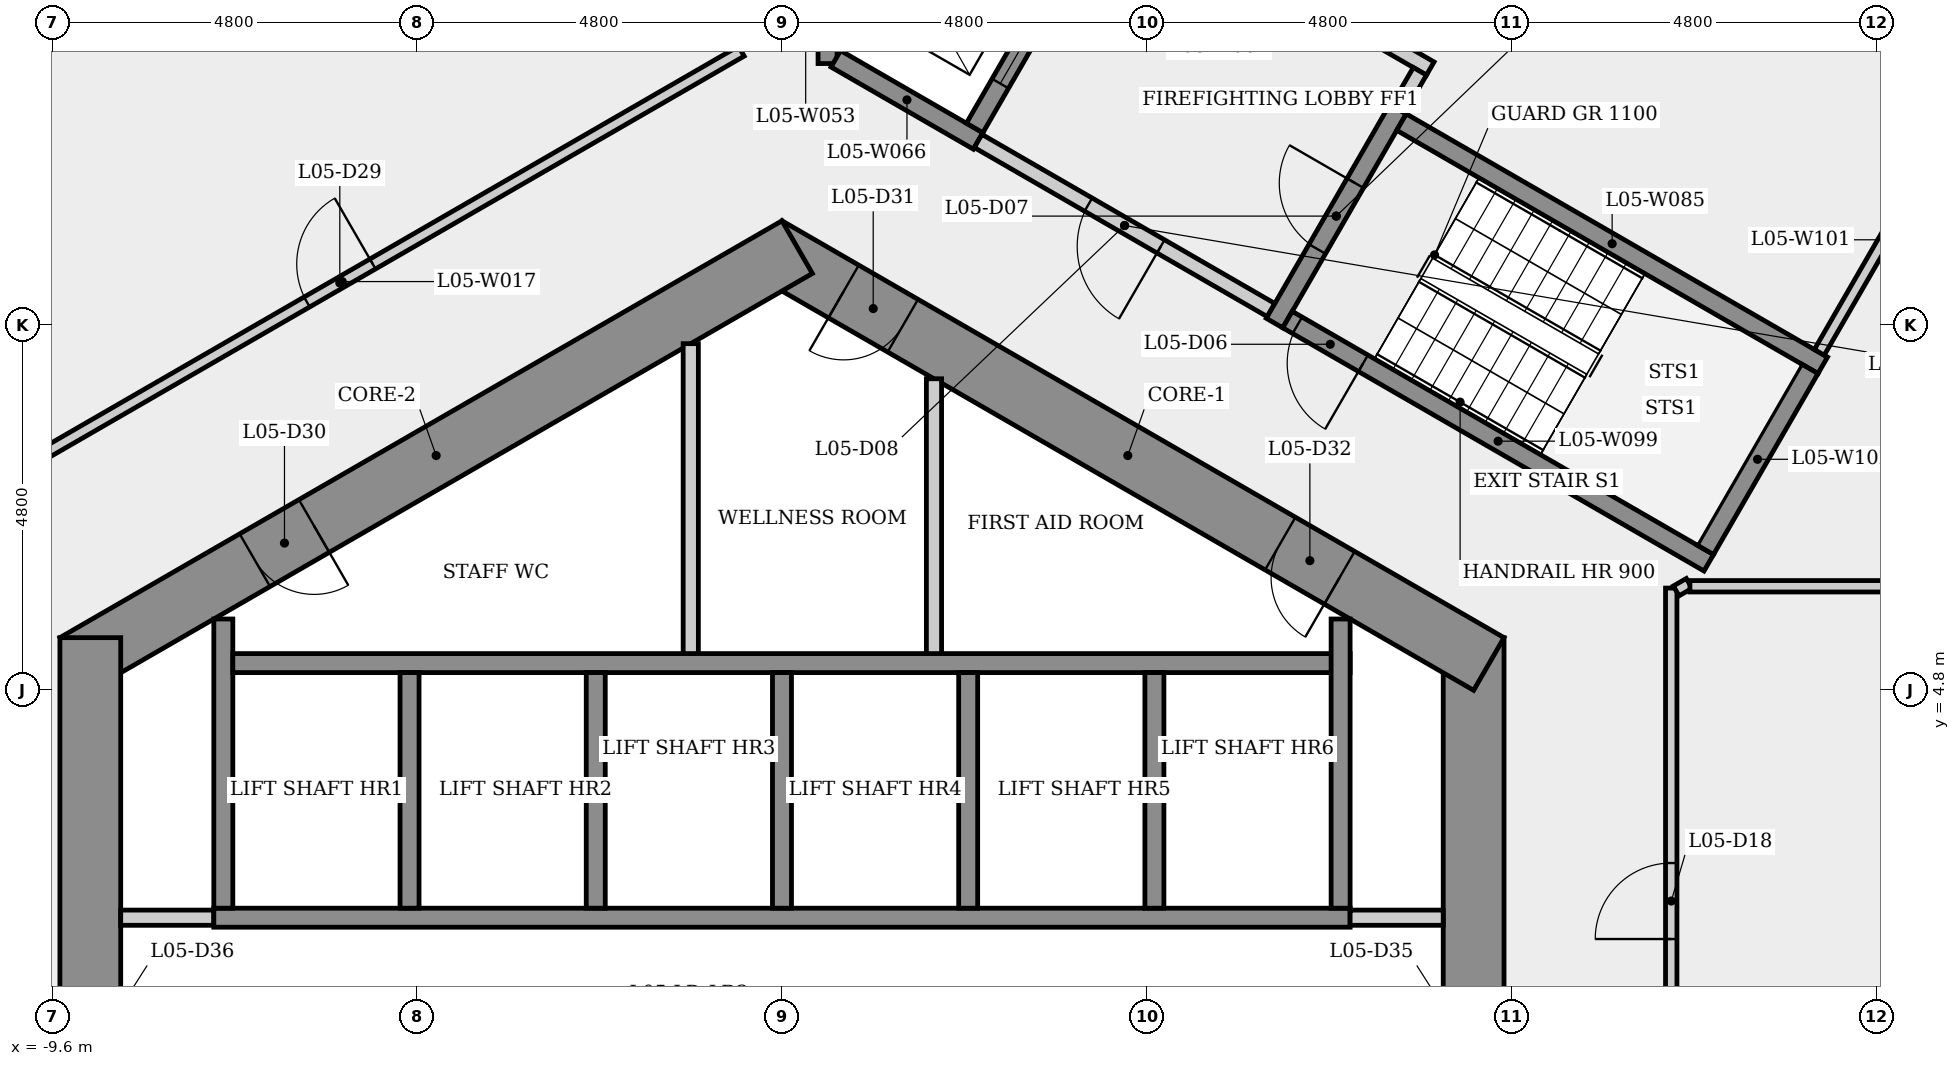
"""IFC4 building model, lengths in metres.
Left out: names, types, materials, properties, quantities, classifications, styles, units other than length and angle.
Written with IfcOpenShell. Run it as: python <this file> out.ifc"""

import sys

from ifc_helpers import new_model, si_unit, direction, frame, frame_2d, origin, place, context, subcontext, project, spatial, rectangle, extrude, element, fill, save


model = new_model("IFC4")
c1 = context("Model", 3, precision=1e-05, world=origin(), true_north=direction((0.0, 1.0)))
c2 = subcontext(c1, "Body", "Model", "MODEL_VIEW")
j1 = project(units=[si_unit("LENGTHUNIT", "METRE"), si_unit("PLANEANGLEUNIT", "RADIAN")], contexts=[c1])
p1 = place(None, origin())
s1 = spatial("IfcSite", under=j1, at=p1, CompositionType="ELEMENT")
p2 = place(p1, origin())
s2 = spatial("IfcBuilding", under=s1, at=p2, CompositionType="ELEMENT")
p3 = place(p2, frame((0.0, 0.0, 25.5)))
s3 = spatial("IfcBuildingStorey", under=s2, at=p3, CompositionType="ELEMENT", Elevation=25.5)
p4 = place(p3, frame((9.1, -5.485, 0.0), z_axis=(0.0, 0.0, 1.0), x_axis=(0.0, 1.0, 0.0)))
e1 = element("IfcWall", 1, at=p4, inside=s3, PredefinedType="SHEAR", context=c2, shape_type="SweptSolid", body=[
    extrude(rectangle(XDim=10.97, YDim=0.8, at=frame_2d((5.485, 0.0))), origin(), (0.0, 0.0, 1.0), 3.4),
])
p5 = place(p4, frame((4.685, 0.0, 0.0)))
e2 = element("IfcOpeningElement", 2, at=p5, cuts=e1, PredefinedType="OPENING", context=c2, shape_type="SweptSolid", body=[
    extrude(rectangle(XDim=1.6, YDim=2.1, at=frame_2d((0.8, 1.05))), frame((0.0, 0.41, 0.0), z_axis=(0.0, -1.0, 0.0), x_axis=(1.0, 0.0, 0.0)), (0.0, 0.0, 1.0), 0.82),
])
p6 = place(p3, frame((9.3, 5.138, 0.0), z_axis=(0.0, 0.0, 1.0), x_axis=(-0.866023993627, 0.500002442456, 0.0)))
e3 = element("IfcWall", 3, at=p6, inside=s3, PredefinedType="SHEAR", context=c2, shape_type="SweptSolid", body=[
    extrude(rectangle(XDim=10.97, YDim=0.8, at=frame_2d((5.485, 0.0))), origin(), (0.0, 0.0, 1.0), 3.4),
])
p7 = place(p6, frame((8.903, 0.0, 0.0)))
e4 = element("IfcOpeningElement", 4, at=p7, cuts=e3, PredefinedType="OPENING", context=c2, shape_type="SweptSolid", body=[
    extrude(rectangle(XDim=0.9, YDim=2.1, at=frame_2d((0.45, 1.05))), frame((0.0, 0.41, 0.0), z_axis=(0.0, -1.0, 0.0), x_axis=(1.0, 0.0, 0.0)), (0.0, 0.0, 1.0), 0.82),
])
p8 = place(p6, frame((2.269, 0.0, 0.0)))
e5 = element("IfcOpeningElement", 5, at=p8, cuts=e3, PredefinedType="OPENING", context=c2, shape_type="SweptSolid", body=[
    extrude(rectangle(XDim=0.9, YDim=2.1, at=frame_2d((0.45, 1.05))), frame((0.0, 0.41, 0.0), z_axis=(0.0, -1.0, 0.0), x_axis=(1.0, 0.0, 0.0)), (0.0, 0.0, 1.0), 0.82),
])
p9 = place(p3, frame((0.2, 10.623, 0.0), z_axis=(0.0, 0.0, 1.0), x_axis=(-0.866023993627, -0.500002442456, 0.0)))
e6 = element("IfcWall", 6, at=p9, inside=s3, PredefinedType="SHEAR", context=c2, shape_type="SweptSolid", body=[
    extrude(rectangle(XDim=10.97, YDim=0.8, at=frame_2d((5.485, 0.0))), origin(), (0.0, 0.0, 1.0), 3.4),
])
p10 = place(p9, frame((7.339, 0.0, 0.0)))
e7 = element("IfcOpeningElement", 7, at=p10, cuts=e6, PredefinedType="OPENING", context=c2, shape_type="SweptSolid", body=[
    extrude(rectangle(XDim=0.9, YDim=2.1, at=frame_2d((0.45, 1.05))), frame((0.0, 0.41, 0.0), z_axis=(0.0, -1.0, 0.0), x_axis=(1.0, 0.0, 0.0)), (0.0, 0.0, 1.0), 0.82),
])
p11 = place(p3, frame((-9.1, 5.485, 0.0), z_axis=(0.0, 0.0, 1.0), x_axis=(0.0, -1.0, 0.0)))
e8 = element("IfcWall", 8, at=p11, inside=s3, PredefinedType="SHEAR", context=c2, shape_type="SweptSolid", body=[
    extrude(rectangle(XDim=10.97, YDim=0.8, at=frame_2d((5.485, 0.0))), origin(), (0.0, 0.0, 1.0), 3.4),
])
p12 = place(p11, frame((4.685, 0.0, 0.0)))
e9 = element("IfcOpeningElement", 9, at=p12, cuts=e8, PredefinedType="OPENING", context=c2, shape_type="SweptSolid", body=[
    extrude(rectangle(XDim=1.6, YDim=2.1, at=frame_2d((0.8, 1.05))), frame((0.0, 0.41, 0.0), z_axis=(0.0, -1.0, 0.0), x_axis=(1.0, 0.0, 0.0)), (0.0, 0.0, 1.0), 0.82),
])
p13 = place(p3, frame((-11.035, 7.139, 0.0), z_axis=(0.0, 0.0, 1.0), x_axis=(0.866022616891, 0.50000482701, 0.0)))
e10 = element("IfcWall", 10, at=p13, inside=s3, PredefinedType="PARTITIONING", context=c2, shape_type="SweptSolid", body=[
    extrude(rectangle(XDim=12.125, YDim=0.15, at=frame_2d((6.062, 0.0))), origin(), (0.0, 0.0, 1.0), 3.05),
])
p14 = place(p13, frame((5.525, 0.0, 0.0)))
e11 = element("IfcOpeningElement", 11, at=p14, cuts=e10, PredefinedType="OPENING", context=c2, shape_type="SweptSolid", body=[
    extrude(rectangle(XDim=1.0, YDim=2.1, at=frame_2d((0.5, 1.05))), frame((0.0, 0.085, 0.0), z_axis=(0.0, -1.0, 0.0), x_axis=(1.0, 0.0, 0.0)), (0.0, 0.0, 1.0), 0.17),
])
p15 = place(p3, frame((-8.7, 1.8, 0.0), z_axis=(0.0, 0.0, 1.0), x_axis=(1.0, 0.0, 0.0)))
e12 = element("IfcWall", 12, at=p15, inside=s3, PredefinedType="PARTITIONING", context=c2, shape_type="SweptSolid", body=[
    extrude(rectangle(XDim=1.225, YDim=0.2, at=frame_2d((0.613, 0.0))), origin(), (0.0, 0.0, 1.0), 3.05),
])
p16 = place(p3, frame((-7.475, 1.8, 0.0), z_axis=(0.0, 0.0, 1.0), x_axis=(1.0, 0.0, 0.0)))
e13 = element("IfcWall", 13, at=p16, inside=s3, PredefinedType="SHEAR", context=c2, shape_type="SweptSolid", body=[
    extrude(rectangle(XDim=14.95, YDim=0.25, at=frame_2d((7.475, 0.0))), origin(), (0.0, 0.0, 1.0), 3.05),
])
p17 = place(p3, frame((-7.35, 1.925, 0.0), z_axis=(0.0, 0.0, 1.0), x_axis=(0.0, 1.0, 0.0)))
e14 = element("IfcWall", 14, at=p17, inside=s3, PredefinedType="SHEAR", context=c2, shape_type="SweptSolid", body=[
    extrude(rectangle(XDim=3.805, YDim=0.25, at=frame_2d((1.903, 0.0))), origin(), (0.0, 0.0, 1.0), 3.05),
])
p18 = place(p3, frame((-7.225, 5.15, 0.0), z_axis=(0.0, 0.0, 1.0), x_axis=(1.0, 0.0, 0.0)))
e15 = element("IfcWall", 15, at=p18, inside=s3, PredefinedType="SHEAR", context=c2, shape_type="SweptSolid", body=[
    extrude(rectangle(XDim=14.7, YDim=0.25, at=frame_2d((7.35, 0.0))), origin(), (0.0, 0.0, 1.0), 3.05),
])
for number, where, z_axis, x_axis in (
    (16, (-4.9, 5.025, 0.0), (0.0, 0.0, 1.0), (0.0, -1.0, 0.0)),
    (17, (-2.45, 5.025, 0.0), (0.0, 0.0, 1.0), (0.0, -1.0, 0.0)),
):
    element("IfcWall", number, at=place(p3, frame(where, z_axis=z_axis, x_axis=x_axis)), inside=s3, PredefinedType="SHEAR", context=c2, shape_type="SweptSolid", body=[
        extrude(rectangle(XDim=3.1, YDim=0.25, at=frame_2d((1.55, 0.0))), origin(), (0.0, 0.0, 1.0), 3.4),
    ])
p19 = place(p3, frame((-1.2, 9.353, 0.0), z_axis=(0.0, 0.0, 1.0), x_axis=(0.0, -1.0, 0.0)))
e18 = element("IfcWall", 18, at=p19, inside=s3, PredefinedType="PARTITIONING", context=c2, shape_type="SweptSolid", body=[
    extrude(rectangle(XDim=4.078, YDim=0.2, at=frame_2d((2.039, 0.0))), origin(), (0.0, 0.0, 1.0), 3.05),
])
p20 = place(p3, frame((0.0, 5.025, 0.0), z_axis=(0.0, 0.0, 1.0), x_axis=(0.0, -1.0, 0.0)))
e19 = element("IfcWall", 19, at=p20, inside=s3, PredefinedType="SHEAR", context=c2, shape_type="SweptSolid", body=[
    extrude(rectangle(XDim=3.1, YDim=0.25, at=frame_2d((1.55, 0.0))), origin(), (0.0, 0.0, 1.0), 3.4),
])
p21 = place(p3, frame((0.6, 13.039, 0.0), z_axis=(0.0, 0.0, 1.0), x_axis=(0.0, 1.0, 0.0)))
e20 = element("IfcWall", 20, at=p21, inside=s3, PredefinedType="SHEAR", context=c2, shape_type="SweptSolid", body=[
    extrude(rectangle(XDim=0.896, YDim=0.25, at=frame_2d((0.448, 0.0))), origin(), (0.0, 0.0, 1.0), 3.05),
])
p22 = place(p3, frame((2.0, 8.891, 0.0), z_axis=(0.0, 0.0, 1.0), x_axis=(0.0, -1.0, 0.0)))
e21 = element("IfcWall", 21, at=p22, inside=s3, PredefinedType="PARTITIONING", context=c2, shape_type="SweptSolid", body=[
    extrude(rectangle(XDim=3.616, YDim=0.2, at=frame_2d((1.808, 0.0))), origin(), (0.0, 0.0, 1.0), 3.05),
])
p23 = place(p3, frame((2.45, 5.025, 0.0), z_axis=(0.0, 0.0, 1.0), x_axis=(0.0, -1.0, 0.0)))
e22 = element("IfcWall", 22, at=p23, inside=s3, PredefinedType="SHEAR", context=c2, shape_type="SweptSolid", body=[
    extrude(rectangle(XDim=3.1, YDim=0.25, at=frame_2d((1.55, 0.0))), origin(), (0.0, 0.0, 1.0), 3.4),
])
p24 = place(p3, frame((2.581, 12.02, 0.0), z_axis=(0.0, 0.0, 1.0), x_axis=(-0.86603892542, 0.499976579108, 0.0)))
e23 = element("IfcWall", 23, at=p24, inside=s3, PredefinedType="SHEAR", context=c2, shape_type="SweptSolid", body=[
    extrude(rectangle(XDim=2.162, YDim=0.25, at=frame_2d((1.081, 0.0))), origin(), (0.0, 0.0, 1.0), 3.05),
])
p25 = place(p3, frame((2.535, 12.191, 0.0), z_axis=(0.0, 0.0, 1.0), x_axis=(0.500061746146, 0.865989751695, 0.0)))
e24 = element("IfcWall", 24, at=p25, inside=s3, PredefinedType="SHEAR", context=c2, shape_type="SweptSolid", body=[
    extrude(rectangle(XDim=2.45, YDim=0.25, at=frame_2d((1.225, 0.0))), origin(), (0.0, 0.0, 1.0), 3.4),
])
p26 = place(p25, frame((0.675, 0.0, 0.0)))
e25 = element("IfcOpeningElement", 25, at=p26, cuts=e24, PredefinedType="OPENING", context=c2, shape_type="SweptSolid", body=[
    extrude(rectangle(XDim=1.1, YDim=2.1, at=frame_2d((0.55, 1.05))), frame((0.0, 0.135, 0.0), z_axis=(0.0, -1.0, 0.0), x_axis=(1.0, 0.0, 0.0)), (0.0, 0.0, 1.0), 0.27),
])
p27 = place(p3, frame((4.459, 15.323, 0.0), z_axis=(0.0, 0.0, 1.0), x_axis=(0.866016039709, -0.500016218704, 0.0)))
e26 = element("IfcWall", 26, at=p27, inside=s3, PredefinedType="PARTITIONING", context=c2, shape_type="SweptSolid", body=[
    extrude(rectangle(XDim=4.7, YDim=0.2, at=frame_2d((2.35, 0.0))), origin(), (0.0, 0.0, 1.0), 3.05),
])
p28 = place(p3, frame((4.9, 5.025, 0.0), z_axis=(0.0, 0.0, 1.0), x_axis=(0.0, -1.0, 0.0)))
e27 = element("IfcWall", 27, at=p28, inside=s3, PredefinedType="SHEAR", context=c2, shape_type="SweptSolid", body=[
    extrude(rectangle(XDim=3.1, YDim=0.25, at=frame_2d((1.55, 0.0))), origin(), (0.0, 0.0, 1.0), 3.4),
])
p29 = place(p3, frame((6.435, 9.795, 0.0), z_axis=(0.0, 0.0, 1.0), x_axis=(-0.866012907634, 0.500021643343, 0.0)))
e28 = element("IfcWall", 28, at=p29, inside=s3, PredefinedType="PARTITIONING", context=c2, shape_type="SweptSolid", body=[
    extrude(rectangle(XDim=4.45, YDim=0.2, at=frame_2d((2.225, 0.0))), origin(), (0.0, 0.0, 1.0), 3.05),
])
p30 = place(p29, frame((1.675, 0.0, 0.0)))
e29 = element("IfcOpeningElement", 29, at=p30, cuts=e28, PredefinedType="OPENING", context=c2, shape_type="SweptSolid", body=[
    extrude(rectangle(XDim=1.1, YDim=2.1, at=frame_2d((0.55, 1.05))), frame((0.0, 0.11, 0.0), z_axis=(0.0, -1.0, 0.0), x_axis=(1.0, 0.0, 0.0)), (0.0, 0.0, 1.0), 0.22),
])
p31 = place(p3, frame((6.48, 9.624, 0.0), z_axis=(0.0, 0.0, 1.0), x_axis=(0.500017246033, 0.866015446554, 0.0)))
e30 = element("IfcWall", 30, at=p31, inside=s3, PredefinedType="SHEAR", context=c2, shape_type="SweptSolid", body=[
    extrude(rectangle(XDim=3.25, YDim=0.25, at=frame_2d((1.625, 0.0))), origin(), (0.0, 0.0, 1.0), 3.05),
])
p32 = place(p31, frame((1.125, 0.0, 0.0)))
e31 = element("IfcOpeningElement", 31, at=p32, cuts=e30, PredefinedType="OPENING", context=c2, shape_type="SweptSolid", body=[
    extrude(rectangle(XDim=1.0, YDim=2.1, at=frame_2d((0.5, 1.05))), frame((0.0, 0.135, 0.0), z_axis=(0.0, -1.0, 0.0), x_axis=(1.0, 0.0, 0.0)), (0.0, 0.0, 1.0), 0.27),
])
p33 = place(p3, frame((7.475, 1.8, 0.0), z_axis=(0.0, 0.0, 1.0), x_axis=(1.0, 0.0, 0.0)))
e32 = element("IfcWall", 32, at=p33, inside=s3, PredefinedType="PARTITIONING", context=c2, shape_type="SweptSolid", body=[
    extrude(rectangle(XDim=1.225, YDim=0.2, at=frame_2d((0.613, 0.0))), origin(), (0.0, 0.0, 1.0), 3.05),
])
p34 = place(p3, frame((7.35, 5.73, 0.0), z_axis=(0.0, 0.0, 1.0), x_axis=(0.0, -1.0, 0.0)))
e33 = element("IfcWall", 33, at=p34, inside=s3, PredefinedType="SHEAR", context=c2, shape_type="SweptSolid", body=[
    extrude(rectangle(XDim=3.805, YDim=0.25, at=frame_2d((1.903, 0.0))), origin(), (0.0, 0.0, 1.0), 3.05),
])
p35 = place(p3, frame((8.151, 12.268, 0.0), z_axis=(0.0, 0.0, 1.0), x_axis=(0.866025499775, -0.499999833739, 0.0)))
e34 = element("IfcWall", 34, at=p35, inside=s3, PredefinedType="SHEAR", context=c2, shape_type="SweptSolid", body=[
    extrude(rectangle(XDim=6.4, YDim=0.25, at=frame_2d((3.2, 0.0))), origin(), (0.0, 0.0, 1.0), 3.05),
])
p36 = place(p3, frame((8.393, 12.937, 0.0), z_axis=(0.0, 0.0, 1.0), x_axis=(-0.500065409566, -0.86598763626, 0.0)))
e35 = element("IfcWall", 35, at=p36, inside=s3, PredefinedType="PARTITIONING", context=c2, shape_type="SweptSolid", body=[
    extrude(rectangle(XDim=0.575, YDim=0.2, at=frame_2d((0.288, 0.0))), origin(), (0.0, 0.0, 1.0), 3.05),
])
p37 = place(p3, frame((11.7, -5.987, 0.0), z_axis=(0.0, 0.0, 1.0), x_axis=(0.0, 1.0, 0.0)))
e36 = element("IfcWall", 36, at=p37, inside=s3, PredefinedType="PARTITIONING", context=c2, shape_type="SweptSolid", body=[
    extrude(rectangle(XDim=12.125, YDim=0.15, at=frame_2d((6.062, 0.0))), origin(), (0.0, 0.0, 1.0), 3.05),
])
p38 = place(p37, frame((7.507, 0.0, 0.0)))
e37 = element("IfcOpeningElement", 37, at=p38, cuts=e36, PredefinedType="OPENING", context=c2, shape_type="SweptSolid", body=[
    extrude(rectangle(XDim=1.0, YDim=2.1, at=frame_2d((0.5, 1.05))), frame((0.0, 0.085, 0.0), z_axis=(0.0, -1.0, 0.0), x_axis=(1.0, 0.0, 0.0)), (0.0, 0.0, 1.0), 0.17),
])
p39 = place(p3, frame((11.936, 6.198, 0.0), z_axis=(0.0, 0.0, 1.0), x_axis=(-0.866103179807, -0.499865263774, 0.0)))
e38 = element("IfcWall", 38, at=p39, inside=s3, PredefinedType="PARTITIONING", context=c2, shape_type="SweptSolid", body=[
    extrude(rectangle(XDim=0.197, YDim=0.15, at=frame_2d((0.099, 0.0))), origin(), (0.0, 0.0, 1.0), 3.05),
])
p40 = place(p3, frame((12.194, 6.47, 0.0), z_axis=(0.0, 0.0, 1.0), x_axis=(-0.866025499775, 0.499999833739, 0.0)))
e39 = element("IfcWall", 39, at=p40, inside=s3, PredefinedType="SHEAR", context=c2, shape_type="SweptSolid", body=[
    extrude(rectangle(XDim=6.4, YDim=0.25, at=frame_2d((3.2, 0.0))), origin(), (0.0, 0.0, 1.0), 3.05),
])
p41 = place(p40, frame((5.25, 0.0, 0.0)))
e40 = element("IfcOpeningElement", 40, at=p41, cuts=e39, PredefinedType="OPENING", context=c2, shape_type="SweptSolid", body=[
    extrude(rectangle(XDim=1.0, YDim=2.1, at=frame_2d((0.5, 1.05))), frame((0.0, 0.135, 0.0), z_axis=(0.0, -1.0, 0.0), x_axis=(1.0, 0.0, 0.0)), (0.0, 0.0, 1.0), 0.27),
])
p42 = place(p3, frame((13.648, 9.239, 0.0), z_axis=(0.0, 0.0, 1.0), x_axis=(0.500000491645, 0.866025119933, 0.0)))
e41 = element("IfcWall", 41, at=p42, inside=s3, PredefinedType="PARTITIONING", context=c2, shape_type="SweptSolid", body=[
    extrude(rectangle(XDim=3.42, YDim=0.15, at=frame_2d((1.71, 0.0))), origin(), (0.0, 0.0, 1.0), 3.05),
])
p43 = place(p3, frame((13.523, 9.022, 0.0), z_axis=(0.0, 0.0, 1.0), x_axis=(-0.500034990121, -0.866005201286, 0.0)))
e42 = element("IfcWall", 42, at=p43, inside=s3, PredefinedType="SHEAR", context=c2, shape_type="SweptSolid", body=[
    extrude(rectangle(XDim=2.75, YDim=0.25, at=frame_2d((1.375, 0.0))), origin(), (0.0, 0.0, 1.0), 3.05),
])
p44 = place(p3, frame((18.695, 6.161, 0.0), z_axis=(0.0, 0.0, 1.0), x_axis=(-1.0, 0.0, 0.0)))
e43 = element("IfcWall", 43, at=p44, inside=s3, PredefinedType="PARTITIONING", context=c2, shape_type="SweptSolid", body=[
    extrude(rectangle(XDim=6.75, YDim=0.15, at=frame_2d((3.375, 0.0))), origin(), (0.0, 0.0, 1.0), 3.05),
])
p45 = place(p41, origin())
e44 = element("IfcDoor", 44, at=p45, inside=s3, OperationType="SINGLE_SWING_LEFT", PredefinedType="DOOR", context=c2, shape_type="SweptSolid", body=[
    extrude(rectangle(XDim=1.0, YDim=2.1, at=frame_2d((0.5, 1.05))), frame((0.0, 0.025, 0.0), z_axis=(0.0, -1.0, 0.0), x_axis=(1.0, 0.0, 0.0)), (0.0, 0.0, 1.0), 0.05),
])
fill(e40, e44)
p46 = place(p32, origin())
e45 = element("IfcDoor", 45, at=p46, inside=s3, OperationType="SINGLE_SWING_RIGHT", PredefinedType="DOOR", context=c2, shape_type="SweptSolid", body=[
    extrude(rectangle(XDim=1.0, YDim=2.1, at=frame_2d((0.5, 1.05))), frame((0.0, 0.025, 0.0), z_axis=(0.0, -1.0, 0.0), x_axis=(1.0, 0.0, 0.0)), (0.0, 0.0, 1.0), 0.05),
])
fill(e31, e45)
p47 = place(p30, origin())
e46 = element("IfcDoor", 46, at=p47, inside=s3, OperationType="SINGLE_SWING_LEFT", PredefinedType="DOOR", context=c2, shape_type="SweptSolid", body=[
    extrude(rectangle(XDim=1.1, YDim=2.1, at=frame_2d((0.55, 1.05))), frame((0.0, 0.025, 0.0), z_axis=(0.0, -1.0, 0.0), x_axis=(1.0, 0.0, 0.0)), (0.0, 0.0, 1.0), 0.05),
])
fill(e29, e46)
p48 = place(p26, origin())
e47 = element("IfcDoor", 47, at=p48, inside=s3, OperationType="SLIDING_TO_LEFT", PredefinedType="DOOR", context=c2, shape_type="SweptSolid", body=[
    extrude(rectangle(XDim=1.1, YDim=2.1, at=frame_2d((0.55, 1.05))), frame((0.0, 0.025, 0.0), z_axis=(0.0, -1.0, 0.0), x_axis=(1.0, 0.0, 0.0)), (0.0, 0.0, 1.0), 0.05),
])
fill(e25, e47)
p49 = place(p38, origin())
e48 = element("IfcDoor", 48, at=p49, inside=s3, OperationType="SINGLE_SWING_LEFT", PredefinedType="DOOR", context=c2, shape_type="SweptSolid", body=[
    extrude(rectangle(XDim=1.0, YDim=2.1, at=frame_2d((0.5, 1.05))), frame((0.0, 0.025, 0.0), z_axis=(0.0, -1.0, 0.0), x_axis=(1.0, 0.0, 0.0)), (0.0, 0.0, 1.0), 0.05),
])
fill(e37, e48)
p50 = place(p14, origin())
e49 = element("IfcDoor", 49, at=p50, inside=s3, OperationType="SINGLE_SWING_RIGHT", PredefinedType="DOOR", context=c2, shape_type="SweptSolid", body=[
    extrude(rectangle(XDim=1.0, YDim=2.1, at=frame_2d((0.5, 1.05))), frame((0.0, 0.025, 0.0), z_axis=(0.0, -1.0, 0.0), x_axis=(1.0, 0.0, 0.0)), (0.0, 0.0, 1.0), 0.05),
])
fill(e11, e49)
p51 = place(p10, origin())
e50 = element("IfcDoor", 50, at=p51, inside=s3, OperationType="SINGLE_SWING_LEFT", PredefinedType="DOOR", context=c2, shape_type="SweptSolid", body=[
    extrude(rectangle(XDim=0.9, YDim=2.1, at=frame_2d((0.45, 1.05))), frame((0.0, 0.025, 0.0), z_axis=(0.0, -1.0, 0.0), x_axis=(1.0, 0.0, 0.0)), (0.0, 0.0, 1.0), 0.05),
])
fill(e7, e50)
p52 = place(p7, origin())
e51 = element("IfcDoor", 51, at=p52, inside=s3, OperationType="SINGLE_SWING_RIGHT", PredefinedType="DOOR", context=c2, shape_type="SweptSolid", body=[
    extrude(rectangle(XDim=0.9, YDim=2.1, at=frame_2d((0.45, 1.05))), frame((0.0, 0.025, 0.0), z_axis=(0.0, -1.0, 0.0), x_axis=(1.0, 0.0, 0.0)), (0.0, 0.0, 1.0), 0.05),
])
fill(e4, e51)
p53 = place(p8, origin())
e52 = element("IfcDoor", 52, at=p53, inside=s3, OperationType="SINGLE_SWING_LEFT", PredefinedType="DOOR", context=c2, shape_type="SweptSolid", body=[
    extrude(rectangle(XDim=0.9, YDim=2.1, at=frame_2d((0.45, 1.05))), frame((0.0, 0.025, 0.0), z_axis=(0.0, -1.0, 0.0), x_axis=(1.0, 0.0, 0.0)), (0.0, 0.0, 1.0), 0.05),
])
fill(e5, e52)
save(model, sys.argv[1])
